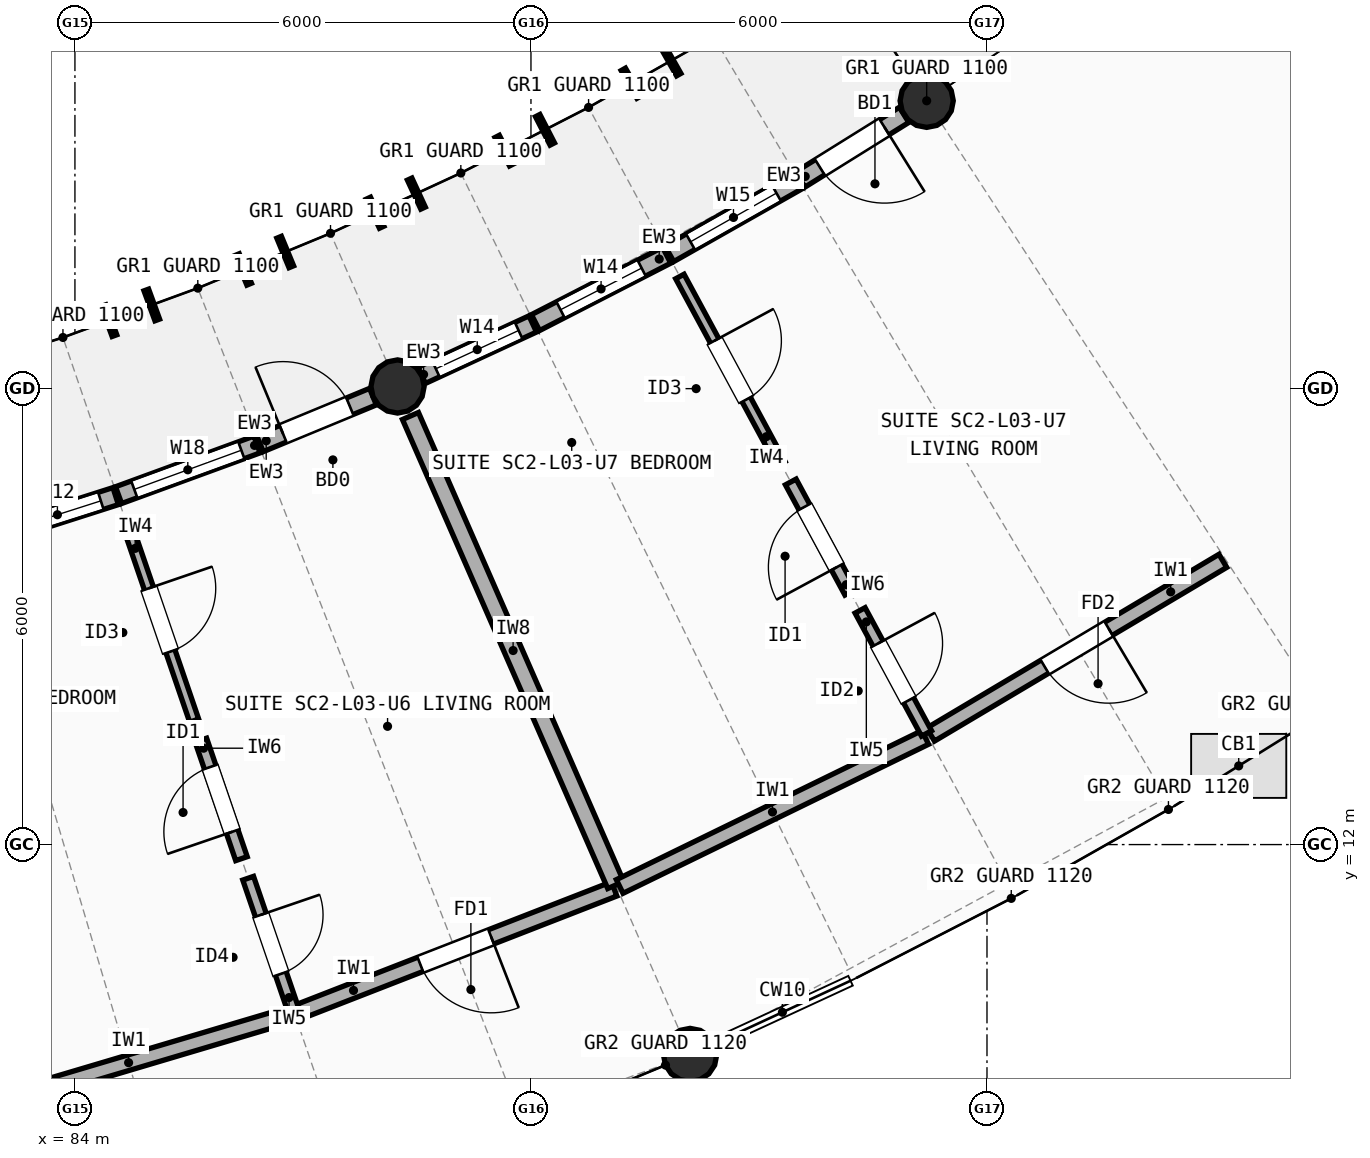
"""IFC4 building model, lengths in metres.
Left out: names, types, materials, properties, quantities, classifications, styles, units other than length and angle.
Written with IfcOpenShell. Run it as: python <this file> out.ifc"""

import sys

from ifc_helpers import new_model, si_unit, direction, frame, frame_2d, origin, origin_2d, place, context, subcontext, project, spatial, rectangle, circle, extrude, element, fill, save


model = new_model("IFC4")
c1 = context("Model", 3, precision=1e-05, world=origin(), true_north=direction((0.0, 1.0)))
c2 = subcontext(c1, "Body", "Model", "MODEL_VIEW")
j1 = project(units=[si_unit("LENGTHUNIT", "METRE"), si_unit("PLANEANGLEUNIT", "RADIAN")], contexts=[c1])
p1 = place(None, origin())
s1 = spatial("IfcSite", under=j1, at=p1, CompositionType="ELEMENT")
p2 = place(p1, origin())
s2 = spatial("IfcBuilding", under=s1, at=p2, CompositionType="ELEMENT")
p3 = place(p2, frame((0.0, 0.0, 10.9)))
s3 = spatial("IfcBuildingStorey", under=s2, at=p3, CompositionType="ELEMENT", Elevation=10.9)
for number, where, z_axis, x_axis in (
    (1, (88.245, 18.027, 0.0), (0.0, 0.0, 1.0), (1.0, 0.0, 0.0)),
    (2, (92.094, 9.232, 0.0), (0.0, 0.0, 1.0), (1.0, 0.0, 0.0)),
    (3, (95.207, 21.785, 0.0), (0.0, 0.0, 1.0), (1.0, 0.0, 0.0)),
):
    element("IfcColumn", number, at=place(p3, frame(where, z_axis=z_axis, x_axis=x_axis)), inside=s3, PredefinedType="COLUMN", context=c2, shape_type="SweptSolid", body=[
        extrude(circle(Radius=0.35, at=origin_2d()), origin(), (0.0, 0.0, 1.0), 2.948),
    ])
p4 = place(p3, frame((83.003, 16.094, 0.0), z_axis=(0.0, 0.0, 1.0), x_axis=(0.952508629145, 0.304511594861, 0.0)))
e4 = element("IfcWall", 4, at=p4, inside=s3, PredefinedType="STANDARD", context=c2, shape_type="SweptSolid", body=[
    extrude(rectangle(XDim=1.61, YDim=0.235, at=frame_2d((0.805, 0.0))), origin(), (0.0, 0.0, 1.0), 2.684),
])
p5 = place(p4, frame((0.205, 0.0, 0.85)))
e5 = element("IfcOpeningElement", 5, at=p5, cuts=e4, PredefinedType="OPENING", context=c2, shape_type="SweptSolid", body=[
    extrude(rectangle(XDim=1.2, YDim=1.35, at=frame_2d((0.6, 0.675))), frame((0.0, 0.127, 0.0), z_axis=(0.0, -1.0, 0.0), x_axis=(1.0, 0.0, 0.0)), (0.0, 0.0, 1.0), 0.255),
])
p6 = place(p3, frame((84.574, 16.597, 0.0), z_axis=(0.0, 0.0, 1.0), x_axis=(0.939178301307, 0.343429932235, 0.0)))
e6 = element("IfcWall", 6, at=p6, inside=s3, PredefinedType="STANDARD", context=c2, shape_type="SweptSolid", body=[
    extrude(rectangle(XDim=1.94, YDim=0.235, at=frame_2d((0.97, 0.0))), origin(), (0.0, 0.0, 1.0), 2.684),
])
p7 = place(p6, frame((0.22, 0.0, 0.85)))
e7 = element("IfcOpeningElement", 7, at=p7, cuts=e6, PredefinedType="OPENING", context=c2, shape_type="SweptSolid", body=[
    extrude(rectangle(XDim=1.5, YDim=1.4, at=frame_2d((0.75, 0.7))), frame((0.0, 0.127, 0.0), z_axis=(0.0, -1.0, 0.0), x_axis=(1.0, 0.0, 0.0)), (0.0, 0.0, 1.0), 0.255),
])
p8 = place(p3, frame((86.433, 17.278, 0.0), z_axis=(0.0, 0.0, 1.0), x_axis=(0.924159027547, 0.382007973481, 0.0)))
e8 = element("IfcWall", 8, at=p8, inside=s3, PredefinedType="STANDARD", context=c2, shape_type="SweptSolid", body=[
    extrude(rectangle(XDim=1.61, YDim=0.235, at=frame_2d((0.805, 0.0))), origin(), (0.0, 0.0, 1.0), 2.684),
])
p9 = place(p8, frame((0.33, 0.0, 0.0)))
e9 = element("IfcOpeningElement", 9, at=p9, cuts=e8, PredefinedType="OPENING", context=c2, shape_type="SweptSolid", body=[
    extrude(rectangle(XDim=0.95, YDim=2.12, at=frame_2d((0.475, 1.06))), frame((0.0, 0.127, 0.0), z_axis=(0.0, -1.0, 0.0), x_axis=(1.0, 0.0, 0.0)), (0.0, 0.0, 1.0), 0.255),
])
p10 = place(p3, frame((88.562, 18.174, 0.0), z_axis=(0.0, 0.0, 1.0), x_axis=(0.907572868664, 0.419894615427, 0.0)))
e10 = element("IfcWall", 10, at=p10, inside=s3, PredefinedType="STANDARD", context=c2, shape_type="SweptSolid", body=[
    extrude(rectangle(XDim=1.61, YDim=0.235, at=frame_2d((0.805, 0.0))), origin(), (0.0, 0.0, 1.0), 2.684),
])
p11 = place(p10, frame((0.205, 0.0, 0.85)))
e11 = element("IfcOpeningElement", 11, at=p11, cuts=e10, PredefinedType="OPENING", context=c2, shape_type="SweptSolid", body=[
    extrude(rectangle(XDim=1.2, YDim=1.5, at=frame_2d((0.6, 0.75))), frame((0.0, 0.127, 0.0), z_axis=(0.0, -1.0, 0.0), x_axis=(1.0, 0.0, 0.0)), (0.0, 0.0, 1.0), 0.255),
])
p12 = place(p3, frame((90.06, 18.867, 0.0), z_axis=(0.0, 0.0, 1.0), x_axis=(0.889517261343, 0.456901566832, 0.0)))
e12 = element("IfcWall", 12, at=p12, inside=s3, PredefinedType="STANDARD", context=c2, shape_type="SweptSolid", body=[
    extrude(rectangle(XDim=1.94, YDim=0.235, at=frame_2d((0.97, 0.0))), origin(), (0.0, 0.0, 1.0), 2.684),
])
p13 = place(p12, frame((0.37, 0.0, 0.85)))
e13 = element("IfcOpeningElement", 13, at=p13, cuts=e12, PredefinedType="OPENING", context=c2, shape_type="SweptSolid", body=[
    extrude(rectangle(XDim=1.2, YDim=1.5, at=frame_2d((0.6, 0.75))), frame((0.0, 0.127, 0.0), z_axis=(0.0, -1.0, 0.0), x_axis=(1.0, 0.0, 0.0)), (0.0, 0.0, 1.0), 0.255),
])
p14 = place(p3, frame((91.821, 19.772, 0.0), z_axis=(0.0, 0.0, 1.0), x_axis=(0.86993400964, 0.493168144623, 0.0)))
e14 = element("IfcWall", 14, at=p14, inside=s3, PredefinedType="STANDARD", context=c2, shape_type="SweptSolid", body=[
    extrude(rectangle(XDim=1.94, YDim=0.235, at=frame_2d((0.97, 0.0))), origin(), (0.0, 0.0, 1.0), 2.684),
])
p15 = place(p14, frame((0.32, 0.0, 0.85)))
e15 = element("IfcOpeningElement", 15, at=p15, cuts=e14, PredefinedType="OPENING", context=c2, shape_type="SweptSolid", body=[
    extrude(rectangle(XDim=1.3, YDim=1.45, at=frame_2d((0.65, 0.725))), frame((0.0, 0.127, 0.0), z_axis=(0.0, -1.0, 0.0), x_axis=(1.0, 0.0, 0.0)), (0.0, 0.0, 1.0), 0.255),
])
p16 = place(p3, frame((93.543, 20.75, 0.0), z_axis=(0.0, 0.0, 1.0), x_axis=(0.848934138406, 0.528498655296, 0.0)))
e16 = element("IfcWall", 16, at=p16, inside=s3, PredefinedType="STANDARD", context=c2, shape_type="SweptSolid", body=[
    extrude(rectangle(XDim=1.61, YDim=0.235, at=frame_2d((0.805, 0.0))), origin(), (0.0, 0.0, 1.0), 2.684),
])
p17 = place(p16, frame((0.305, 0.0, 0.0)))
e17 = element("IfcOpeningElement", 17, at=p17, cuts=e16, PredefinedType="OPENING", context=c2, shape_type="SweptSolid", body=[
    extrude(rectangle(XDim=1.0, YDim=2.15, at=frame_2d((0.5, 1.075))), frame((0.0, 0.127, 0.0), z_axis=(0.0, -1.0, 0.0), x_axis=(1.0, 0.0, 0.0)), (0.0, 0.0, 1.0), 0.255),
])
p18 = place(p3, frame((82.562, 8.494, 0.0), z_axis=(0.0, 0.0, 1.0), x_axis=(0.958602413557, 0.28474798107, 0.0)))
e18 = element("IfcWall", 18, at=p18, inside=s3, PredefinedType="SOLIDWALL", context=c2, shape_type="SweptSolid", body=[
    extrude(rectangle(XDim=4.473, YDim=0.2, at=frame_2d((2.236, 0.0))), origin(), (0.0, 0.0, 1.0), 2.762),
])
p19 = place(p3, frame((86.926, 9.793, 0.0), z_axis=(0.0, 0.0, 1.0), x_axis=(0.931847867525, 0.362849213571, 0.0)))
e19 = element("IfcWall", 19, at=p19, inside=s3, PredefinedType="SOLIDWALL", context=c2, shape_type="SweptSolid", body=[
    extrude(rectangle(XDim=4.473, YDim=0.2, at=frame_2d((2.237, 0.0))), origin(), (0.0, 0.0, 1.0), 2.742),
])
p20 = place(p19, frame((1.737, 0.0, 0.0)))
e20 = element("IfcOpeningElement", 20, at=p20, cuts=e19, PredefinedType="OPENING", context=c2, shape_type="SweptSolid", body=[
    extrude(rectangle(XDim=1.0, YDim=2.15, at=frame_2d((0.5, 1.075))), frame((0.0, 0.11, 0.0), z_axis=(0.0, -1.0, 0.0), x_axis=(1.0, 0.0, 0.0)), (0.0, 0.0, 1.0), 0.22),
])
p21 = place(p3, frame((84.662, 16.28, 0.0), z_axis=(0.0, 0.0, 1.0), x_axis=(0.32401221778, -0.94605289637, 0.0)))
e21 = element("IfcWall", 21, at=p21, inside=s3, PredefinedType="PARTITIONING", context=c2, shape_type="SweptSolid", body=[
    extrude(rectangle(XDim=2.8, YDim=0.125, at=frame_2d((1.4, 0.0))), origin(), (0.0, 0.0, 1.0), 2.722),
])
p22 = place(p21, frame((0.96, 0.0, 0.0)))
e22 = element("IfcOpeningElement", 22, at=p22, cuts=e21, PredefinedType="OPENING", context=c2, shape_type="SweptSolid", body=[
    extrude(rectangle(XDim=0.88, YDim=2.1, at=frame_2d((0.44, 1.05))), frame((0.0, 0.073, 0.0), z_axis=(0.0, -1.0, 0.0), x_axis=(1.0, 0.0, 0.0)), (0.0, 0.0, 1.0), 0.145),
])
p23 = place(p3, frame((85.657, 13.374, 0.0), z_axis=(0.0, 0.0, 1.0), x_axis=(0.324127376206, -0.946013448104, 0.0)))
e23 = element("IfcWall", 23, at=p23, inside=s3, PredefinedType="PLUMBINGWALL", context=c2, shape_type="SweptSolid", body=[
    extrude(rectangle(XDim=1.648, YDim=0.16, at=frame_2d((0.824, 0.0))), origin(), (0.0, 0.0, 1.0), 2.722),
])
p24 = place(p23, frame((0.374, 0.0, 0.0)))
e24 = element("IfcOpeningElement", 24, at=p24, cuts=e23, PredefinedType="OPENING", context=c2, shape_type="SweptSolid", body=[
    extrude(rectangle(XDim=0.9, YDim=2.1, at=frame_2d((0.45, 1.05))), frame((0.0, 0.09, 0.0), z_axis=(0.0, -1.0, 0.0), x_axis=(1.0, 0.0, 0.0)), (0.0, 0.0, 1.0), 0.18),
])
p25 = place(p3, frame((86.279, 11.558, 0.0), z_axis=(0.0, 0.0, 1.0), x_axis=(0.323978335312, -0.946064500046, 0.0)))
e25 = element("IfcWall", 25, at=p25, inside=s3, PredefinedType="PARTITIONING", context=c2, shape_type="SweptSolid", body=[
    extrude(rectangle(XDim=1.84, YDim=0.15, at=frame_2d((0.92, 0.0))), origin(), (0.0, 0.0, 1.0), 2.722),
])
p26 = place(p25, frame((0.51, 0.0, 0.0)))
e26 = element("IfcOpeningElement", 26, at=p26, cuts=e25, PredefinedType="OPENING", context=c2, shape_type="SweptSolid", body=[
    extrude(rectangle(XDim=0.82, YDim=2.08, at=frame_2d((0.41, 1.04))), frame((0.0, 0.085, 0.0), z_axis=(0.0, -1.0, 0.0), x_axis=(1.0, 0.0, 0.0)), (0.0, 0.0, 1.0), 0.17),
])
p27 = place(p3, frame((88.415, 17.638, 0.0), z_axis=(0.0, 0.0, 1.0), x_axis=(0.400932910895, -0.916107417807, 0.0)))
e27 = element("IfcWall", 27, at=p27, inside=s3, PredefinedType="SOLIDWALL", context=c2, shape_type="SweptSolid", body=[
    extrude(rectangle(XDim=6.736, YDim=0.23, at=frame_2d((3.368, 0.0))), origin(), (0.0, 0.0, 1.0), 2.762),
])
p28 = place(p3, frame((91.167, 11.448, 0.0), z_axis=(0.0, 0.0, 1.0), x_axis=(0.898794149603, 0.438370934985, 0.0)))
e28 = element("IfcWall", 28, at=p28, inside=s3, PredefinedType="SOLIDWALL", context=c2, shape_type="SweptSolid", body=[
    extrude(rectangle(XDim=4.473, YDim=0.2, at=frame_2d((2.236, 0.0))), origin(), (0.0, 0.0, 1.0), 2.722),
])
p29 = place(p3, frame((95.258, 13.447, 0.0), z_axis=(0.0, 0.0, 1.0), x_axis=(0.859614290038, 0.510943511909, 0.0)))
e29 = element("IfcWall", 29, at=p29, inside=s3, PredefinedType="SOLIDWALL", context=c2, shape_type="SweptSolid", body=[
    extrude(rectangle(XDim=4.473, YDim=0.2, at=frame_2d((2.236, 0.0))), origin(), (0.0, 0.0, 1.0), 2.762),
])
p30 = place(p29, frame((1.747, 0.0, 0.0)))
e30 = element("IfcOpeningElement", 30, at=p30, cuts=e29, PredefinedType="OPENING", context=c2, shape_type="SweptSolid", body=[
    extrude(rectangle(XDim=0.98, YDim=2.15, at=frame_2d((0.49, 1.075))), frame((0.0, 0.11, 0.0), z_axis=(0.0, -1.0, 0.0), x_axis=(1.0, 0.0, 0.0)), (0.0, 0.0, 1.0), 0.22),
])
p31 = place(p3, frame((91.959, 19.474, 0.0), z_axis=(0.0, 0.0, 1.0), x_axis=(0.475103009949, -0.879930184695, 0.0)))
e31 = element("IfcWall", 31, at=p31, inside=s3, PredefinedType="PARTITIONING", context=c2, shape_type="SweptSolid", body=[
    extrude(rectangle(XDim=2.8, YDim=0.125, at=frame_2d((1.4, 0.0))), origin(), (0.0, 0.0, 1.0), 2.742),
])
p32 = place(p31, frame((0.96, 0.0, 0.0)))
e32 = element("IfcOpeningElement", 32, at=p32, cuts=e31, PredefinedType="OPENING", context=c2, shape_type="SweptSolid", body=[
    extrude(rectangle(XDim=0.88, YDim=2.1, at=frame_2d((0.44, 1.05))), frame((0.0, 0.073, 0.0), z_axis=(0.0, -1.0, 0.0), x_axis=(1.0, 0.0, 0.0)), (0.0, 0.0, 1.0), 0.145),
])
p33 = place(p3, frame((93.418, 16.771, 0.0), z_axis=(0.0, 0.0, 1.0), x_axis=(0.475080097018, -0.879942555749, 0.0)))
e33 = element("IfcWall", 33, at=p33, inside=s3, PredefinedType="PLUMBINGWALL", context=c2, shape_type="SweptSolid", body=[
    extrude(rectangle(XDim=1.648, YDim=0.16, at=frame_2d((0.824, 0.0))), origin(), (0.0, 0.0, 1.0), 2.742),
])
p34 = place(p33, frame((0.374, 0.0, 0.0)))
e34 = element("IfcOpeningElement", 34, at=p34, cuts=e33, PredefinedType="OPENING", context=c2, shape_type="SweptSolid", body=[
    extrude(rectangle(XDim=0.9, YDim=2.1, at=frame_2d((0.45, 1.05))), frame((0.0, 0.09, 0.0), z_axis=(0.0, -1.0, 0.0), x_axis=(1.0, 0.0, 0.0)), (0.0, 0.0, 1.0), 0.18),
])
p35 = place(p3, frame((94.331, 15.081, 0.0), z_axis=(0.0, 0.0, 1.0), x_axis=(0.475017414672, -0.879976395001, 0.0)))
e35 = element("IfcWall", 35, at=p35, inside=s3, PredefinedType="PARTITIONING", context=c2, shape_type="SweptSolid", body=[
    extrude(rectangle(XDim=1.84, YDim=0.15, at=frame_2d((0.92, 0.0))), origin(), (0.0, 0.0, 1.0), 2.742),
])
p36 = place(p35, frame((0.495, 0.0, 0.0)))
e36 = element("IfcOpeningElement", 36, at=p36, cuts=e35, PredefinedType="OPENING", context=c2, shape_type="SweptSolid", body=[
    extrude(rectangle(XDim=0.85, YDim=2.1, at=frame_2d((0.425, 1.05))), frame((0.0, 0.085, 0.0), z_axis=(0.0, -1.0, 0.0), x_axis=(1.0, 0.0, 0.0)), (0.0, 0.0, 1.0), 0.17),
])
p37 = place(p5, origin())
e37 = element("IfcWindow", 37, at=p37, inside=s3, PartitioningType="SINGLE_PANEL", PredefinedType="WINDOW", context=c2, shape_type="SweptSolid", body=[
    extrude(rectangle(XDim=1.2, YDim=1.35, at=frame_2d((0.6, 0.675))), frame((0.0, 0.03, 0.0), z_axis=(0.0, -1.0, 0.0), x_axis=(1.0, 0.0, 0.0)), (0.0, 0.0, 1.0), 0.06),
])
fill(e5, e37)
p38 = place(p7, origin())
e38 = element("IfcWindow", 38, at=p38, inside=s3, PartitioningType="SINGLE_PANEL", PredefinedType="WINDOW", context=c2, shape_type="SweptSolid", body=[
    extrude(rectangle(XDim=1.5, YDim=1.4, at=frame_2d((0.75, 0.7))), frame((0.0, 0.03, 0.0), z_axis=(0.0, -1.0, 0.0), x_axis=(1.0, 0.0, 0.0)), (0.0, 0.0, 1.0), 0.06),
])
fill(e7, e38)
p39 = place(p9, origin())
e39 = element("IfcDoor", 39, at=p39, inside=s3, OperationType="SINGLE_SWING_LEFT", PredefinedType="DOOR", context=c2, shape_type="SweptSolid", body=[
    extrude(rectangle(XDim=0.95, YDim=2.12, at=frame_2d((0.475, 1.06))), frame((0.0, 0.025, 0.0), z_axis=(0.0, -1.0, 0.0), x_axis=(1.0, 0.0, 0.0)), (0.0, 0.0, 1.0), 0.05),
])
fill(e9, e39)
p40 = place(p11, origin())
e40 = element("IfcWindow", 40, at=p40, inside=s3, PartitioningType="SINGLE_PANEL", PredefinedType="WINDOW", context=c2, shape_type="SweptSolid", body=[
    extrude(rectangle(XDim=1.2, YDim=1.5, at=frame_2d((0.6, 0.75))), frame((0.0, 0.03, 0.0), z_axis=(0.0, -1.0, 0.0), x_axis=(1.0, 0.0, 0.0)), (0.0, 0.0, 1.0), 0.06),
])
fill(e11, e40)
p41 = place(p13, origin())
e41 = element("IfcWindow", 41, at=p41, inside=s3, PartitioningType="SINGLE_PANEL", PredefinedType="WINDOW", context=c2, shape_type="SweptSolid", body=[
    extrude(rectangle(XDim=1.2, YDim=1.5, at=frame_2d((0.6, 0.75))), frame((0.0, 0.03, 0.0), z_axis=(0.0, -1.0, 0.0), x_axis=(1.0, 0.0, 0.0)), (0.0, 0.0, 1.0), 0.06),
])
fill(e13, e41)
p42 = place(p15, origin())
e42 = element("IfcWindow", 42, at=p42, inside=s3, PartitioningType="SINGLE_PANEL", PredefinedType="WINDOW", context=c2, shape_type="SweptSolid", body=[
    extrude(rectangle(XDim=1.3, YDim=1.45, at=frame_2d((0.65, 0.725))), frame((0.0, 0.03, 0.0), z_axis=(0.0, -1.0, 0.0), x_axis=(1.0, 0.0, 0.0)), (0.0, 0.0, 1.0), 0.06),
])
fill(e15, e42)
p43 = place(p17, origin())
e43 = element("IfcDoor", 43, at=p43, inside=s3, OperationType="SINGLE_SWING_RIGHT", PredefinedType="DOOR", context=c2, shape_type="SweptSolid", body=[
    extrude(rectangle(XDim=1.0, YDim=2.15, at=frame_2d((0.5, 1.075))), frame((0.0, 0.025, 0.0), z_axis=(0.0, -1.0, 0.0), x_axis=(1.0, 0.0, 0.0)), (0.0, 0.0, 1.0), 0.05),
])
fill(e17, e43)
p44 = place(p20, origin())
e44 = element("IfcDoor", 44, at=p44, inside=s3, OperationType="SINGLE_SWING_RIGHT", PredefinedType="DOOR", context=c2, shape_type="SweptSolid", body=[
    extrude(rectangle(XDim=1.0, YDim=2.15, at=frame_2d((0.5, 1.075))), frame((0.0, 0.025, 0.0), z_axis=(0.0, -1.0, 0.0), x_axis=(1.0, 0.0, 0.0)), (0.0, 0.0, 1.0), 0.05),
])
fill(e20, e44)
p45 = place(p22, origin())
e45 = element("IfcDoor", 45, at=p45, inside=s3, OperationType="SINGLE_SWING_LEFT", PredefinedType="DOOR", context=c2, shape_type="SweptSolid", body=[
    extrude(rectangle(XDim=0.88, YDim=2.1, at=frame_2d((0.44, 1.05))), frame((0.0, 0.025, 0.0), z_axis=(0.0, -1.0, 0.0), x_axis=(1.0, 0.0, 0.0)), (0.0, 0.0, 1.0), 0.05),
])
fill(e22, e45)
p46 = place(p24, origin())
e46 = element("IfcDoor", 46, at=p46, inside=s3, OperationType="SINGLE_SWING_RIGHT", PredefinedType="DOOR", context=c2, shape_type="SweptSolid", body=[
    extrude(rectangle(XDim=0.9, YDim=2.1, at=frame_2d((0.45, 1.05))), frame((0.0, 0.025, 0.0), z_axis=(0.0, -1.0, 0.0), x_axis=(1.0, 0.0, 0.0)), (0.0, 0.0, 1.0), 0.05),
])
fill(e24, e46)
p47 = place(p26, origin())
e47 = element("IfcDoor", 47, at=p47, inside=s3, OperationType="SINGLE_SWING_LEFT", PredefinedType="DOOR", context=c2, shape_type="SweptSolid", body=[
    extrude(rectangle(XDim=0.82, YDim=2.08, at=frame_2d((0.41, 1.04))), frame((0.0, 0.025, 0.0), z_axis=(0.0, -1.0, 0.0), x_axis=(1.0, 0.0, 0.0)), (0.0, 0.0, 1.0), 0.05),
])
fill(e26, e47)
p48 = place(p30, origin())
e48 = element("IfcDoor", 48, at=p48, inside=s3, OperationType="SINGLE_SWING_RIGHT", PredefinedType="DOOR", context=c2, shape_type="SweptSolid", body=[
    extrude(rectangle(XDim=0.98, YDim=2.15, at=frame_2d((0.49, 1.075))), frame((0.0, 0.025, 0.0), z_axis=(0.0, -1.0, 0.0), x_axis=(1.0, 0.0, 0.0)), (0.0, 0.0, 1.0), 0.05),
])
fill(e30, e48)
p49 = place(p32, origin())
e49 = element("IfcDoor", 49, at=p49, inside=s3, OperationType="SINGLE_SWING_LEFT", PredefinedType="DOOR", context=c2, shape_type="SweptSolid", body=[
    extrude(rectangle(XDim=0.88, YDim=2.1, at=frame_2d((0.44, 1.05))), frame((0.0, 0.025, 0.0), z_axis=(0.0, -1.0, 0.0), x_axis=(1.0, 0.0, 0.0)), (0.0, 0.0, 1.0), 0.05),
])
fill(e32, e49)
p50 = place(p34, origin())
e50 = element("IfcDoor", 50, at=p50, inside=s3, OperationType="SINGLE_SWING_RIGHT", PredefinedType="DOOR", context=c2, shape_type="SweptSolid", body=[
    extrude(rectangle(XDim=0.9, YDim=2.1, at=frame_2d((0.45, 1.05))), frame((0.0, 0.025, 0.0), z_axis=(0.0, -1.0, 0.0), x_axis=(1.0, 0.0, 0.0)), (0.0, 0.0, 1.0), 0.05),
])
fill(e34, e50)
p51 = place(p36, origin())
e51 = element("IfcDoor", 51, at=p51, inside=s3, OperationType="SINGLE_SWING_LEFT", PredefinedType="DOOR", context=c2, shape_type="SweptSolid", body=[
    extrude(rectangle(XDim=0.85, YDim=2.1, at=frame_2d((0.425, 1.05))), frame((0.0, 0.025, 0.0), z_axis=(0.0, -1.0, 0.0), x_axis=(1.0, 0.0, 0.0)), (0.0, 0.0, 1.0), 0.05),
])
fill(e36, e51)
save(model, sys.argv[1])
